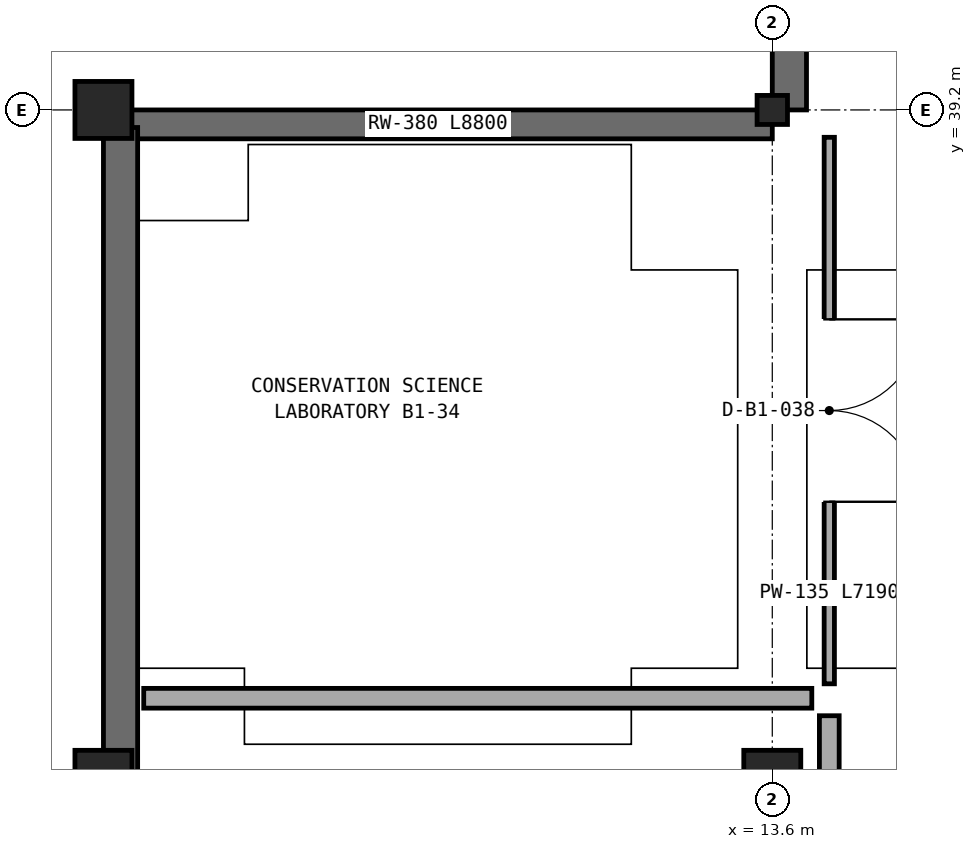
"""IFC4 building model, lengths in metres.
Left out: names, types, materials, properties, quantities, classifications, styles, units other than length and angle.
Written with IfcOpenShell. Run it as: python <this file> out.ifc"""

import sys

from ifc_helpers import new_model, si_unit, direction, frame, frame_2d, origin, origin_2d, place, context, subcontext, project, spatial, rectangle, i_section, extrude, element, fill, save


model = new_model("IFC4")
c1 = context("Model", 3, precision=1e-05, world=origin(), true_north=direction((0.0, 1.0)))
c2 = subcontext(c1, "Body", "Model", "MODEL_VIEW")
j1 = project(units=[si_unit("LENGTHUNIT", "METRE"), si_unit("PLANEANGLEUNIT", "RADIAN")], contexts=[c1])
p1 = place(None, origin())
s1 = spatial("IfcSite", under=j1, at=p1, CompositionType="ELEMENT")
p2 = place(p1, origin())
s2 = spatial("IfcBuilding", under=s1, at=p2, CompositionType="ELEMENT")
p3 = place(p2, frame((0.0, 0.0, -5.4)))
s3 = spatial("IfcBuildingStorey", under=s2, at=p3, CompositionType="ELEMENT", Elevation=-5.4)
for number, where, z_axis, x_axis in (
    (1, (4.8, 30.4, 0.0), (0.0, 0.0, 1.0), (1.0, 0.0, 0.0)),
    (2, (4.8, 39.2, 0.0), (0.0, 0.0, 1.0), (1.0, 0.0, 0.0)),
    (3, (13.6, 30.4, 0.0), (0.0, 0.0, 1.0), (1.0, 0.0, 0.0)),
):
    element("IfcColumn", number, at=place(p3, frame(where, z_axis=z_axis, x_axis=x_axis)), inside=s3, PredefinedType="COLUMN", context=c2, shape_type="SweptSolid", body=[
        extrude(rectangle(XDim=0.75, YDim=0.75, at=origin_2d()), origin(), (0.0, 0.0, 1.0), 5.4),
    ])
p4 = place(p3, frame((13.6, 39.2, 0.0), z_axis=(0.0, 0.0, 1.0), x_axis=(1.0, 0.0, 0.0)))
e4 = element("IfcColumn", 4, at=p4, inside=s3, PredefinedType="COLUMN", context=c2, shape_type="SweptSolid", body=[
    extrude(i_section(OverallWidth=0.4, OverallDepth=0.382, WebThickness=0.025, FlangeThickness=0.036, at=origin_2d()), origin(), (0.0, 0.0, 1.0), 5.4),
])
p5 = place(p3, frame((13.825, 82.969, 0.0), z_axis=(0.0, 0.0, 1.0), x_axis=(0.0, -1.0, 0.0)))
e5 = element("IfcWall", 5, at=p5, inside=s3, PredefinedType="USERDEFINED", context=c2, shape_type="SweptSolid", body=[
    extrude(rectangle(XDim=43.769, YDim=0.45, at=frame_2d((21.885, 0.0))), origin(), (0.0, 0.0, 1.0), 5.06),
])
p6 = place(p3, frame((13.6, 39.01, 0.0), z_axis=(0.0, 0.0, 1.0), x_axis=(-1.0, 0.0, 0.0)))
e6 = element("IfcWall", 6, at=p6, inside=s3, PredefinedType="USERDEFINED", context=c2, shape_type="SweptSolid", body=[
    extrude(rectangle(XDim=8.8, YDim=0.38, at=frame_2d((4.4, 0.0))), origin(), (0.0, 0.0, 1.0), 5.06),
])
p7 = place(p3, frame((5.025, 38.969, 0.0), z_axis=(0.0, 0.0, 1.0), x_axis=(0.0, -1.0, 0.0)))
e7 = element("IfcWall", 7, at=p7, inside=s3, PredefinedType="USERDEFINED", context=c2, shape_type="SweptSolid", body=[
    extrude(rectangle(XDim=34.169, YDim=0.45, at=frame_2d((17.084, 0.0))), origin(), (0.0, 0.0, 1.0), 5.06),
])
p8 = place(p3, frame((14.35, 31.23, 0.0), z_axis=(0.0, 0.0, 1.0), x_axis=(0.0, -1.0, 0.0)))
e8 = element("IfcWall", 8, at=p8, inside=s3, PredefinedType="SOLIDWALL", context=c2, shape_type="SweptSolid", body=[
    extrude(rectangle(XDim=15.67, YDim=0.26, at=frame_2d((7.835, 0.0))), origin(), (0.0, 0.0, 1.0), 4.428),
])
p9 = place(p3, frame((14.35, 38.84, 0.0), z_axis=(0.0, 0.0, 1.0), x_axis=(0.0, -1.0, 0.0)))
e9 = element("IfcWall", 9, at=p9, inside=s3, PredefinedType="PARTITIONING", context=c2, shape_type="SweptSolid", body=[
    extrude(rectangle(XDim=7.19, YDim=0.135, at=frame_2d((3.595, 0.0))), origin(), (0.0, 0.0, 1.0), 5.03),
])
p10 = place(p9, frame((2.395, 0.0, 0.0)))
e10 = element("IfcOpeningElement", 10, at=p10, cuts=e9, PredefinedType="OPENING", context=c2, shape_type="SweptSolid", body=[
    extrude(rectangle(XDim=2.4, YDim=2.58, at=frame_2d((1.2, 1.29))), frame((0.0, 0.078, 0.0), z_axis=(0.0, -1.0, 0.0), x_axis=(1.0, 0.0, 0.0)), (0.0, 0.0, 1.0), 0.155),
])
p11 = place(p3, frame((5.33, 31.46, 0.0), z_axis=(0.0, 0.0, 1.0), x_axis=(1.0, 0.0, 0.0)))
e11 = element("IfcWall", 11, at=p11, inside=s3, PredefinedType="SOLIDWALL", context=c2, shape_type="SweptSolid", body=[
    extrude(rectangle(XDim=8.79, YDim=0.26, at=frame_2d((4.395, 0.0))), origin(), (0.0, 0.0, 1.0), 4.507),
])
p12 = place(p10, origin())
e12 = element("IfcDoor", 12, at=p12, inside=s3, OperationType="DOUBLE_DOOR_SINGLE_SWING", PredefinedType="DOOR", context=c2, shape_type="SweptSolid", body=[
    extrude(rectangle(XDim=2.4, YDim=2.58, at=frame_2d((1.2, 1.29))), frame((0.0, 0.025, 0.0), z_axis=(0.0, -1.0, 0.0), x_axis=(1.0, 0.0, 0.0)), (0.0, 0.0, 1.0), 0.05),
])
fill(e10, e12)
save(model, sys.argv[1])
